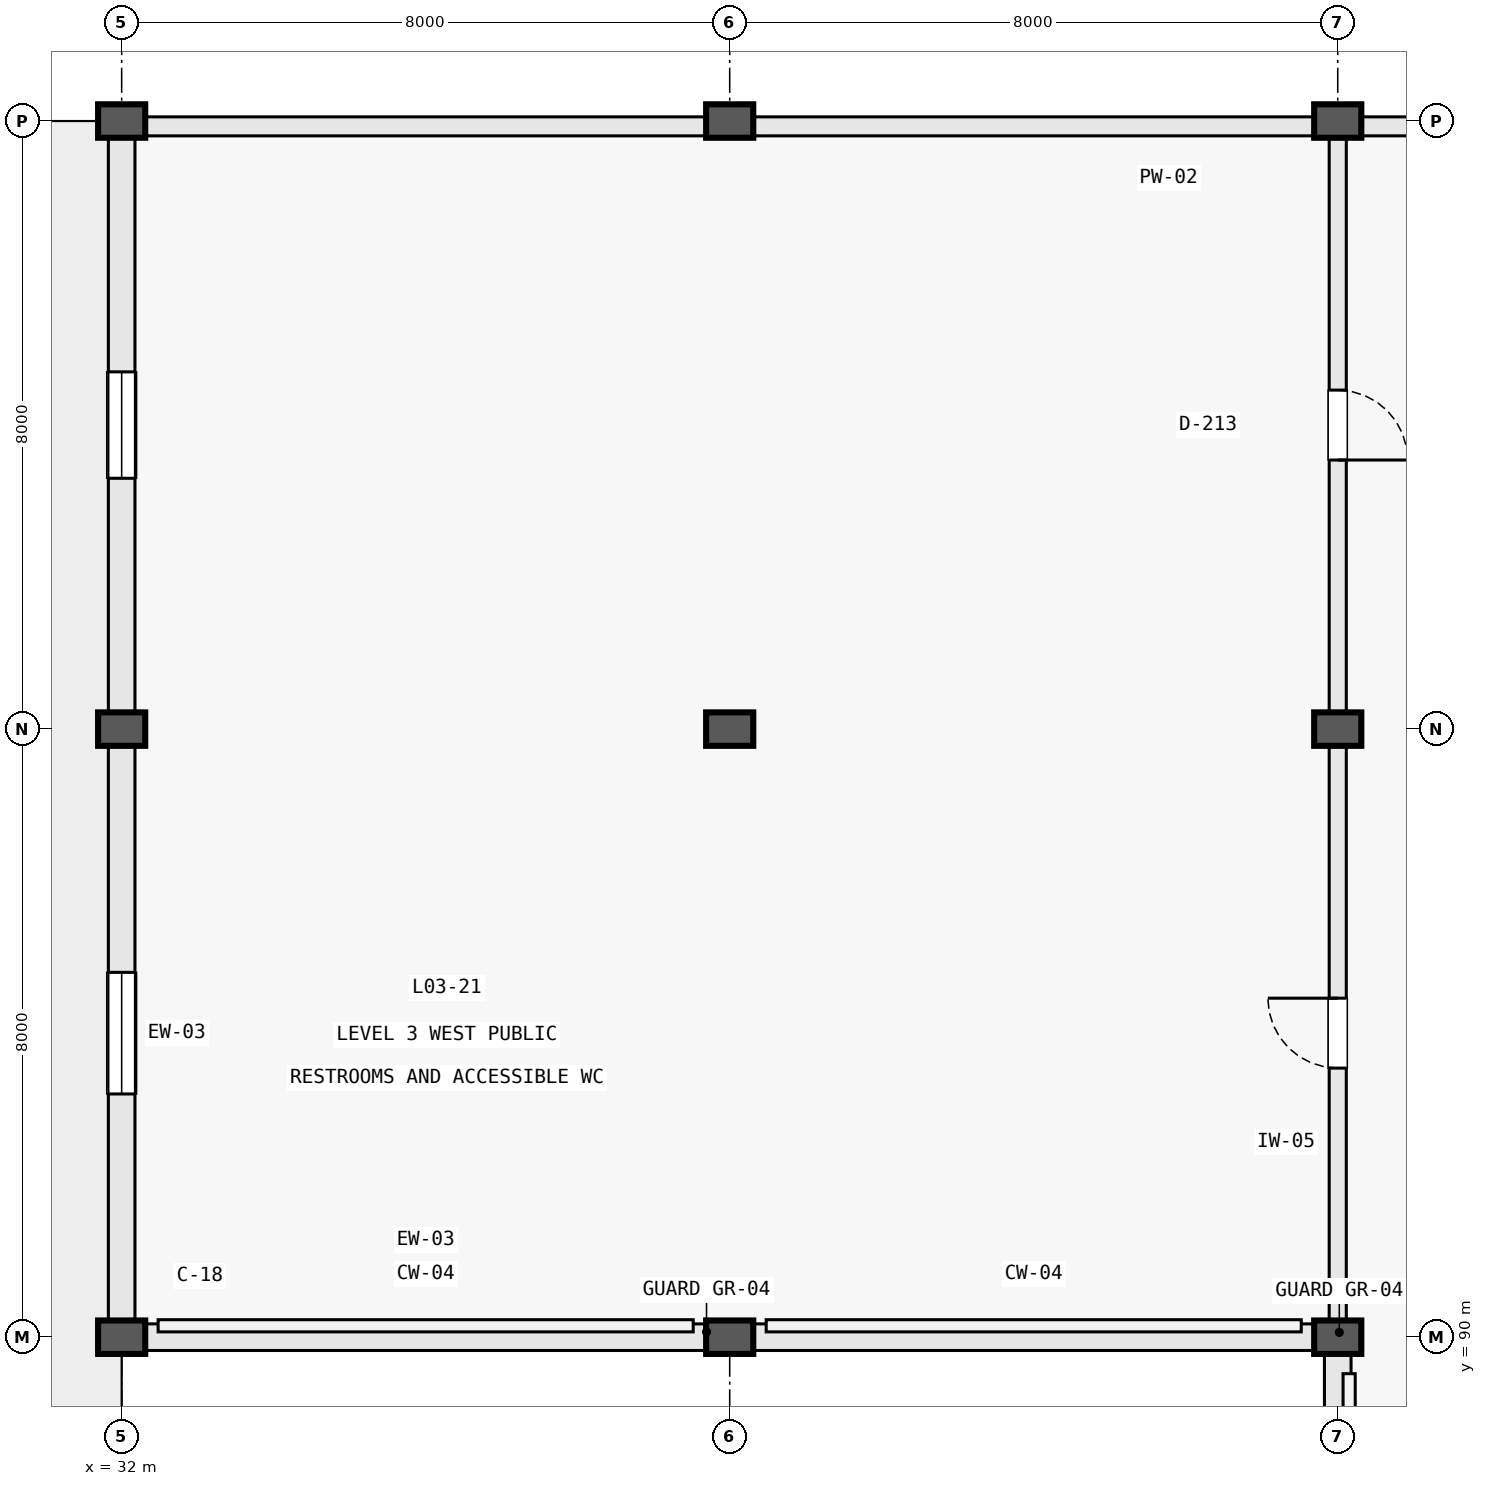
"""IFC4 building model, lengths in metres.
Left out: names, types, materials, properties, quantities, classifications, styles, units other than length and angle.
Written with IfcOpenShell. Run it as: python <this file> out.ifc"""

import sys

from ifc_helpers import new_model, si_unit, direction, frame, frame_2d, origin, origin_2d, place, context, subcontext, project, spatial, rectangle, extrude, element, fill, save


model = new_model("IFC4")
c1 = context("Model", 3, precision=1e-05, world=origin(), true_north=direction((0.0, 1.0)))
c2 = subcontext(c1, "Body", "Model", "MODEL_VIEW")
j1 = project(units=[si_unit("LENGTHUNIT", "METRE"), si_unit("PLANEANGLEUNIT", "RADIAN")], contexts=[c1])
p1 = place(None, origin())
s1 = spatial("IfcSite", under=j1, at=p1, CompositionType="ELEMENT")
p2 = place(p1, origin())
s2 = spatial("IfcBuilding", under=s1, at=p2, CompositionType="ELEMENT")
p3 = place(p2, frame((0.0, 0.0, 10.5)))
s3 = spatial("IfcBuildingStorey", under=s2, at=p3, CompositionType="ELEMENT", Elevation=10.5)
for number, where, z_axis, x_axis in (
    (1, (32.0, 90.0, 0.0), (0.0, 0.0, 1.0), (1.0, 0.0, 0.0)),
    (2, (32.0, 98.0, 0.0), (0.0, 0.0, 1.0), (1.0, 0.0, 0.0)),
    (3, (32.0, 106.0, 0.0), (0.0, 0.0, 1.0), (1.0, 0.0, 0.0)),
    (4, (40.0, 90.0, 0.0), (0.0, 0.0, 1.0), (1.0, 0.0, 0.0)),
    (5, (40.0, 98.0, 0.0), (0.0, 0.0, 1.0), (1.0, 0.0, 0.0)),
    (6, (40.0, 106.0, 0.0), (0.0, 0.0, 1.0), (1.0, 0.0, 0.0)),
    (7, (48.0, 90.0, 0.0), (0.0, 0.0, 1.0), (1.0, 0.0, 0.0)),
    (8, (48.0, 98.0, 0.0), (0.0, 0.0, 1.0), (1.0, 0.0, 0.0)),
    (9, (48.0, 106.0, 0.0), (0.0, 0.0, 1.0), (1.0, 0.0, 0.0)),
):
    element("IfcColumn", number, at=place(p3, frame(where, z_axis=z_axis, x_axis=x_axis)), inside=s3, PredefinedType="COLUMN", context=c2, shape_type="SweptSolid", body=[
        extrude(rectangle(XDim=0.62, YDim=0.44, at=origin_2d()), origin(), (0.0, 0.0, 1.0), 4.8),
    ])
p4 = place(p3, frame((48.0, 89.785, 0.0), z_axis=(0.0, 0.0, 1.0), x_axis=(0.0, -1.0, 0.0)))
e10 = element("IfcWall", 10, at=p4, inside=s3, PredefinedType="STANDARD", context=c2, shape_type="SweptSolid", body=[
    extrude(rectangle(XDim=7.57, YDim=0.35, at=frame_2d((3.785, 0.0))), origin(), (0.0, 0.0, 1.0), 3.52),
])
p5 = place(p4, frame((2.785, 0.0, 0.72)))
e11 = element("IfcOpeningElement", 11, at=p5, cuts=e10, PredefinedType="OPENING", context=c2, shape_type="SweptSolid", body=[
    extrude(rectangle(XDim=2.0, YDim=2.4, at=frame_2d((1.0, 1.2))), frame((0.0, 0.187, 0.0), z_axis=(0.0, -1.0, 0.0), x_axis=(1.0, 0.0, 0.0)), (0.0, 0.0, 1.0), 0.374),
])
p6 = place(p3, frame((32.0, 97.785, 0.0), z_axis=(0.0, 0.0, 1.0), x_axis=(0.0, -1.0, 0.0)))
e12 = element("IfcWall", 12, at=p6, inside=s3, PredefinedType="STANDARD", context=c2, shape_type="SweptSolid", body=[
    extrude(rectangle(XDim=7.57, YDim=0.35, at=frame_2d((3.785, 0.0))), origin(), (0.0, 0.0, 1.0), 3.52),
])
p7 = place(p6, frame((2.985, 0.0, 0.72)))
e13 = element("IfcOpeningElement", 13, at=p7, cuts=e12, PredefinedType="OPENING", context=c2, shape_type="SweptSolid", body=[
    extrude(rectangle(XDim=1.6, YDim=1.95, at=frame_2d((0.8, 0.975))), frame((0.0, 0.187, 0.0), z_axis=(0.0, -1.0, 0.0), x_axis=(1.0, 0.0, 0.0)), (0.0, 0.0, 1.0), 0.374),
])
p8 = place(p3, frame((32.0, 105.785, 0.0), z_axis=(0.0, 0.0, 1.0), x_axis=(0.0, -1.0, 0.0)))
e14 = element("IfcWall", 14, at=p8, inside=s3, PredefinedType="STANDARD", context=c2, shape_type="SweptSolid", body=[
    extrude(rectangle(XDim=7.57, YDim=0.35, at=frame_2d((3.785, 0.0))), origin(), (0.0, 0.0, 1.0), 3.52),
])
p9 = place(p8, frame((3.085, 0.0, 0.72)))
e15 = element("IfcOpeningElement", 15, at=p9, cuts=e14, PredefinedType="OPENING", context=c2, shape_type="SweptSolid", body=[
    extrude(rectangle(XDim=1.4, YDim=1.7, at=frame_2d((0.7, 0.85))), frame((0.0, 0.187, 0.0), z_axis=(0.0, -1.0, 0.0), x_axis=(1.0, 0.0, 0.0)), (0.0, 0.0, 1.0), 0.374),
])
for number, where, z_axis, x_axis in (
    (16, (32.305, 90.0, 0.0), (0.0, 0.0, 1.0), (1.0, 0.0, 0.0)),
    (17, (40.305, 90.0, 0.0), (0.0, 0.0, 1.0), (1.0, 0.0, 0.0)),
):
    element("IfcWall", number, at=place(p3, frame(where, z_axis=z_axis, x_axis=x_axis)), inside=s3, PredefinedType="STANDARD", context=c2, shape_type="SweptSolid", body=[
        extrude(rectangle(XDim=7.39, YDim=0.35, at=frame_2d((3.695, 0.0))), origin(), (0.0, 0.0, 1.0), 3.52),
    ])
p10 = place(p3, frame((48.0, 90.23, 0.0), z_axis=(0.0, 0.0, 1.0), x_axis=(0.0, 1.0, 0.0)))
e18 = element("IfcWall", 18, at=p10, inside=s3, PredefinedType="PARTITIONING", context=c2, shape_type="SweptSolid", body=[
    extrude(rectangle(XDim=7.54, YDim=0.225, at=frame_2d((3.77, 0.0))), origin(), (0.0, 0.0, 1.0), 3.33),
])
p11 = place(p10, frame((3.31, 0.0, 0.0)))
e19 = element("IfcOpeningElement", 19, at=p11, cuts=e18, PredefinedType="OPENING", context=c2, shape_type="SweptSolid", body=[
    extrude(rectangle(XDim=0.92, YDim=2.1, at=frame_2d((0.46, 1.05))), frame((0.0, 0.125, 0.0), z_axis=(0.0, -1.0, 0.0), x_axis=(1.0, 0.0, 0.0)), (0.0, 0.0, 1.0), 0.249),
])
p12 = place(p3, frame((48.0, 98.23, 0.0), z_axis=(0.0, 0.0, 1.0), x_axis=(0.0, 1.0, 0.0)))
e20 = element("IfcWall", 20, at=p12, inside=s3, PredefinedType="PARTITIONING", context=c2, shape_type="SweptSolid", body=[
    extrude(rectangle(XDim=7.54, YDim=0.225, at=frame_2d((3.77, 0.0))), origin(), (0.0, 0.0, 1.0), 3.33),
])
p13 = place(p12, frame((3.31, 0.0, 0.0)))
e21 = element("IfcOpeningElement", 21, at=p13, cuts=e20, PredefinedType="OPENING", context=c2, shape_type="SweptSolid", body=[
    extrude(rectangle(XDim=0.92, YDim=2.1, at=frame_2d((0.46, 1.05))), frame((0.0, 0.125, 0.0), z_axis=(0.0, -1.0, 0.0), x_axis=(1.0, 0.0, 0.0)), (0.0, 0.0, 1.0), 0.249),
])
p14 = place(p3, frame((32.08, 105.93, 0.0), z_axis=(0.0, 0.0, 1.0), x_axis=(0.99999999997, 7.696807e-06, 0.0)))
e22 = element("IfcWall", 22, at=p14, inside=s3, PredefinedType="PARAPET", context=c2, shape_type="SweptSolid", body=[
    extrude(rectangle(XDim=31.72, YDim=0.25, at=frame_2d((15.86, 0.0))), origin(), (0.0, 0.0, 1.0), 1.15),
])
p15 = place(p7, origin())
e23 = element("IfcWindow", 23, at=p15, inside=s3, PartitioningType="SINGLE_PANEL", PredefinedType="WINDOW", context=c2, shape_type="SweptSolid", body=[
    extrude(rectangle(XDim=1.6, YDim=1.95, at=frame_2d((0.8, 0.975))), frame((0.0, 0.03, 0.0), z_axis=(0.0, -1.0, 0.0), x_axis=(1.0, 0.0, 0.0)), (0.0, 0.0, 1.0), 0.06),
])
fill(e13, e23)
p16 = place(p9, origin())
e24 = element("IfcWindow", 24, at=p16, inside=s3, PartitioningType="SINGLE_PANEL", PredefinedType="WINDOW", context=c2, shape_type="SweptSolid", body=[
    extrude(rectangle(XDim=1.4, YDim=1.7, at=frame_2d((0.7, 0.85))), frame((0.0, 0.03, 0.0), z_axis=(0.0, -1.0, 0.0), x_axis=(1.0, 0.0, 0.0)), (0.0, 0.0, 1.0), 0.06),
])
fill(e15, e24)
p17 = place(p11, origin())
e25 = element("IfcDoor", 25, at=p17, inside=s3, OperationType="SINGLE_SWING_RIGHT", PredefinedType="DOOR", context=c2, shape_type="SweptSolid", body=[
    extrude(rectangle(XDim=0.92, YDim=2.1, at=frame_2d((0.46, 1.05))), frame((0.0, 0.025, 0.0), z_axis=(0.0, -1.0, 0.0), x_axis=(1.0, 0.0, 0.0)), (0.0, 0.0, 1.0), 0.05),
])
fill(e19, e25)
p18 = place(p13, frame((0.92, 0.0, 0.0), z_axis=(0.0, 0.0, 1.0), x_axis=(-1.0, 0.0, 0.0)))
e26 = element("IfcDoor", 26, at=p18, inside=s3, OperationType="SINGLE_SWING_LEFT", PredefinedType="DOOR", context=c2, shape_type="SweptSolid", body=[
    extrude(rectangle(XDim=0.92, YDim=2.1, at=frame_2d((0.46, 1.05))), frame((0.0, 0.025, 0.0), z_axis=(0.0, -1.0, 0.0), x_axis=(1.0, 0.0, 0.0)), (0.0, 0.0, 1.0), 0.05),
])
fill(e21, e26)
save(model, sys.argv[1])
